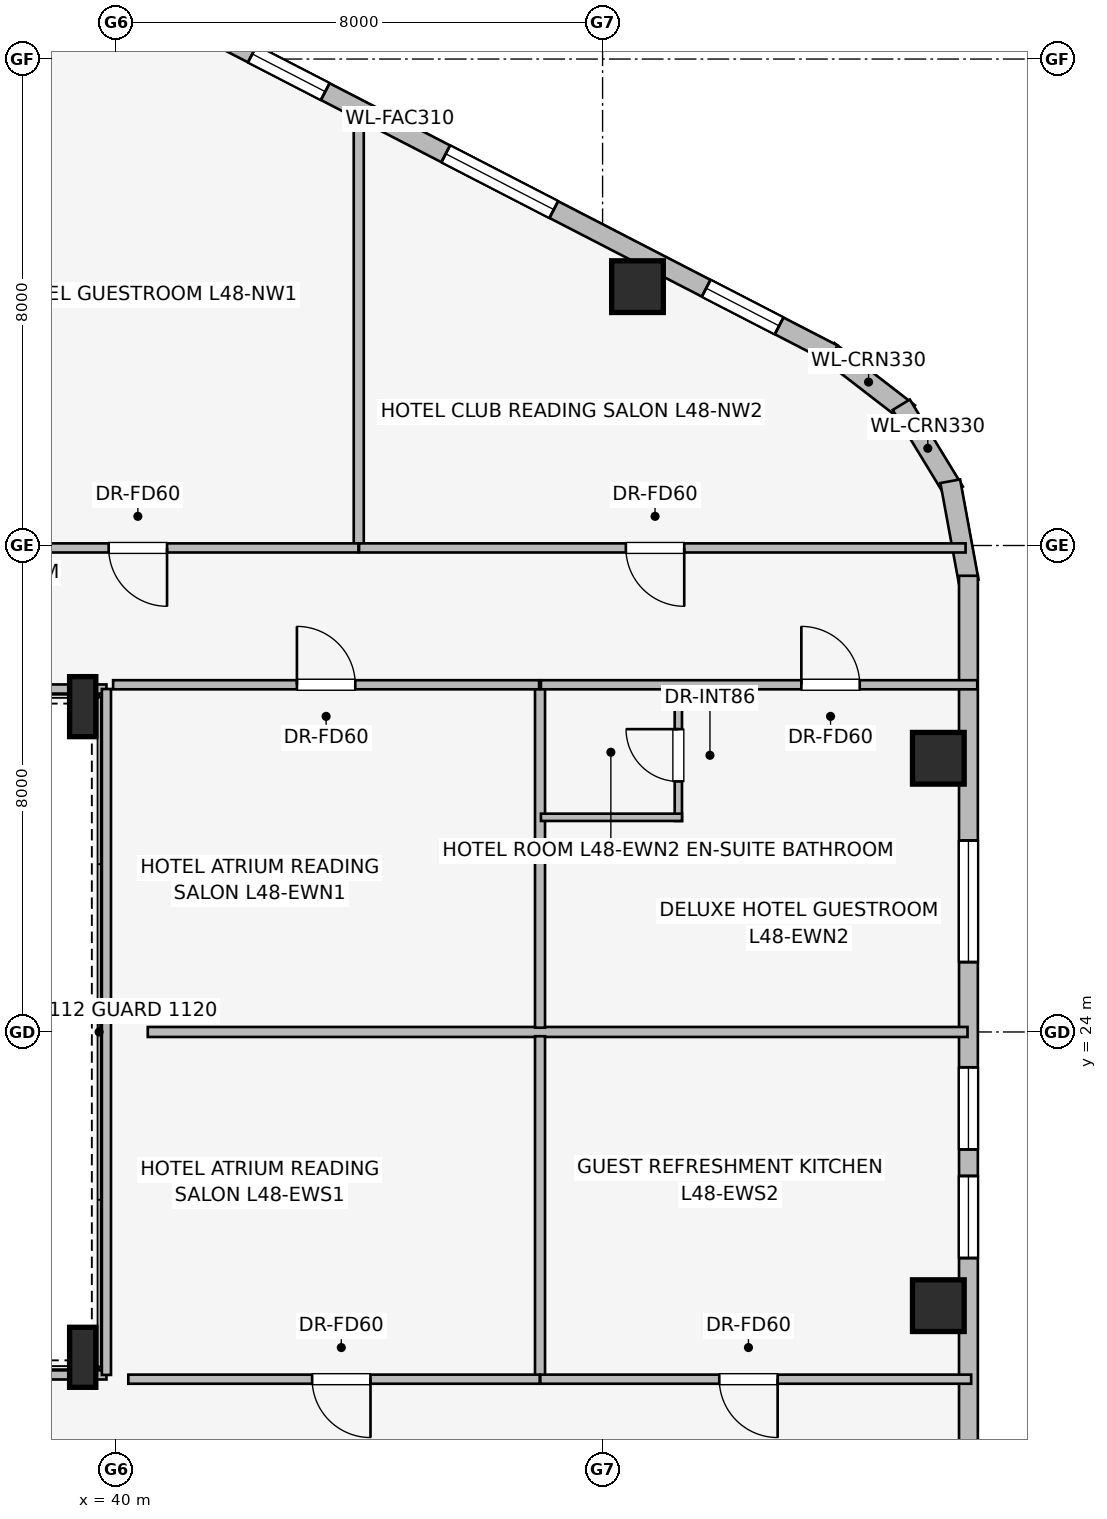
"""IFC4 building model, lengths in metres.
Left out: names, types, materials, properties, quantities, classifications, styles, units other than length and angle.
Written with IfcOpenShell. Run it as: python <this file> out.ifc"""

import sys

from ifc_helpers import new_model, si_unit, direction, frame, frame_2d, origin, origin_2d, place, context, subcontext, project, spatial, rectangle, i_section, extrude, element, fill, save


model = new_model("IFC4")
c1 = context("Model", 3, precision=1e-05, world=origin(), true_north=direction((0.0, 1.0)))
c2 = subcontext(c1, "Body", "Model", "MODEL_VIEW")
j1 = project(units=[si_unit("LENGTHUNIT", "METRE"), si_unit("PLANEANGLEUNIT", "RADIAN")], contexts=[c1])
p1 = place(None, origin())
s1 = spatial("IfcSite", under=j1, at=p1, CompositionType="ELEMENT")
p2 = place(p1, origin())
s2 = spatial("IfcBuilding", under=s1, at=p2, CompositionType="ELEMENT")
p3 = place(p2, frame((0.0, 0.0, 177.45)))
s3 = spatial("IfcBuildingStorey", under=s2, at=p3, CompositionType="ELEMENT", Elevation=177.45)
for number, where, z_axis, x_axis in (
    (1, (48.574, 36.257, 0.0), (0.0, 0.0, 1.0), (1.0, 0.0, 0.0)),
    (2, (53.522, 19.499, 0.0), (0.0, 0.0, 1.0), (1.0, 0.0, 0.0)),
    (3, (53.522, 28.501, 0.0), (0.0, 0.0, 1.0), (1.0, 0.0, 0.0)),
):
    element("IfcColumn", number, at=place(p3, frame(where, z_axis=z_axis, x_axis=x_axis)), inside=s3, PredefinedType="COLUMN", context=c2, shape_type="SweptSolid", body=[
        extrude(rectangle(XDim=0.85, YDim=0.85, at=origin_2d()), origin(), (0.0, 0.0, 1.0), 3.45),
    ])
for number, where, z_axis, x_axis in (
    (4, (39.45, 18.65, 0.0), (0.0, 0.0, 1.0), (1.0, 0.0, 0.0)),
    (5, (39.45, 29.35, 0.0), (0.0, 0.0, 1.0), (1.0, 0.0, 0.0)),
):
    element("IfcColumn", number, at=place(p3, frame(where, z_axis=z_axis, x_axis=x_axis)), inside=s3, PredefinedType="COLUMN", context=c2, shape_type="SweptSolid", body=[
        extrude(i_section(OverallWidth=0.431, OverallDepth=0.987, WebThickness=0.034, FlangeThickness=0.062, at=origin_2d()), origin(), (0.0, 0.0, 1.0), 3.45),
    ])
p4 = place(p3, frame((51.711, 35.2, 0.0), z_axis=(0.0, 0.0, 1.0), x_axis=(0.791464279355, -0.611215423976, 0.0)))
e6 = element("IfcWall", 6, at=p4, inside=s3, PredefinedType="STANDARD", context=c2, shape_type="SweptSolid", body=[
    extrude(rectangle(XDim=1.677, YDim=0.33, at=frame_2d((0.838, 0.0))), origin(), (0.0, 0.0, 1.0), 3.16),
])
p5 = place(p3, frame((52.912, 34.315, 0.0), z_axis=(0.0, 0.0, 1.0), x_axis=(0.520219286058, -0.85403272444, 0.0)))
e7 = element("IfcWall", 7, at=p5, inside=s3, PredefinedType="STANDARD", context=c2, shape_type="SweptSolid", body=[
    extrude(rectangle(XDim=1.678, YDim=0.33, at=frame_2d((0.839, 0.0))), origin(), (0.0, 0.0, 1.0), 3.16),
])
p6 = place(p3, frame((53.718, 33.057, 0.0), z_axis=(0.0, 0.0, 1.0), x_axis=(0.180717642671, -0.983535019014, 0.0)))
e8 = element("IfcWall", 8, at=p6, inside=s3, PredefinedType="STANDARD", context=c2, shape_type="SweptSolid", body=[
    extrude(rectangle(XDim=1.677, YDim=0.33, at=frame_2d((0.838, 0.0))), origin(), (0.0, 0.0, 1.0), 3.16),
])
p7 = place(p3, frame((36.838, 42.871, 0.0), z_axis=(0.0, 0.0, 1.0), x_axis=(0.888626188278, -0.458632202867, 0.0)))
e9 = element("IfcWall", 9, at=p7, inside=s3, PredefinedType="STANDARD", context=c2, shape_type="SweptSolid", body=[
    extrude(rectangle(XDim=16.828, YDim=0.31, at=frame_2d((8.414, 0.0))), origin(), (0.0, 0.0, 1.0), 3.16),
])
p8 = place(p7, frame((0.675, 0.0, 0.75)))
e10 = element("IfcOpeningElement", 10, at=p8, cuts=e9, PredefinedType="OPENING", context=c2, shape_type="SweptSolid", body=[
    extrude(rectangle(XDim=2.0, YDim=1.5, at=frame_2d((1.0, 0.75))), frame((0.0, 0.165, 0.0), z_axis=(0.0, -1.0, 0.0), x_axis=(1.0, 0.0, 0.0)), (0.0, 0.0, 1.0), 0.33),
])
p9 = place(p7, frame((4.196, 0.0, 0.75)))
e11 = element("IfcOpeningElement", 11, at=p9, cuts=e9, PredefinedType="OPENING", context=c2, shape_type="SweptSolid", body=[
    extrude(rectangle(XDim=1.35, YDim=1.45, at=frame_2d((0.675, 0.725))), frame((0.0, 0.165, 0.0), z_axis=(0.0, -1.0, 0.0), x_axis=(1.0, 0.0, 0.0)), (0.0, 0.0, 1.0), 0.33),
])
p10 = place(p7, frame((6.078, 0.0, 0.75)))
e12 = element("IfcOpeningElement", 12, at=p10, cuts=e9, PredefinedType="OPENING", context=c2, shape_type="SweptSolid", body=[
    extrude(rectangle(XDim=1.35, YDim=1.45, at=frame_2d((0.675, 0.725))), frame((0.0, 0.165, 0.0), z_axis=(0.0, -1.0, 0.0), x_axis=(1.0, 0.0, 0.0)), (0.0, 0.0, 1.0), 0.33),
])
p11 = place(p7, frame((9.658, 0.0, 0.75)))
e13 = element("IfcOpeningElement", 13, at=p11, cuts=e9, PredefinedType="OPENING", context=c2, shape_type="SweptSolid", body=[
    extrude(rectangle(XDim=2.0, YDim=1.5, at=frame_2d((1.0, 0.75))), frame((0.0, 0.165, 0.0), z_axis=(0.0, -1.0, 0.0), x_axis=(1.0, 0.0, 0.0)), (0.0, 0.0, 1.0), 0.33),
])
p12 = place(p7, frame((14.478, 0.0, 0.75)))
e14 = element("IfcOpeningElement", 14, at=p12, cuts=e9, PredefinedType="OPENING", context=c2, shape_type="SweptSolid", body=[
    extrude(rectangle(XDim=1.35, YDim=1.45, at=frame_2d((0.675, 0.725))), frame((0.0, 0.165, 0.0), z_axis=(0.0, -1.0, 0.0), x_axis=(1.0, 0.0, 0.0)), (0.0, 0.0, 1.0), 0.33),
])
p13 = place(p3, frame((54.017, 31.502, 0.0), z_axis=(0.0, 0.0, 1.0), x_axis=(0.0, -1.0, 0.0)))
e15 = element("IfcWall", 15, at=p13, inside=s3, PredefinedType="STANDARD", context=c2, shape_type="SweptSolid", body=[
    extrude(rectangle(XDim=15.004, YDim=0.31, at=frame_2d((7.502, 0.0))), origin(), (0.0, 0.0, 1.0), 3.16),
])
p14 = place(p13, frame((4.353, 0.0, 0.75)))
e16 = element("IfcOpeningElement", 16, at=p14, cuts=e15, PredefinedType="OPENING", context=c2, shape_type="SweptSolid", body=[
    extrude(rectangle(XDim=2.0, YDim=1.5, at=frame_2d((1.0, 0.75))), frame((0.0, 0.165, 0.0), z_axis=(0.0, -1.0, 0.0), x_axis=(1.0, 0.0, 0.0)), (0.0, 0.0, 1.0), 0.33),
])
p15 = place(p13, frame((8.083, 0.0, 0.75)))
e17 = element("IfcOpeningElement", 17, at=p15, cuts=e15, PredefinedType="OPENING", context=c2, shape_type="SweptSolid", body=[
    extrude(rectangle(XDim=1.35, YDim=1.45, at=frame_2d((0.675, 0.725))), frame((0.0, 0.165, 0.0), z_axis=(0.0, -1.0, 0.0), x_axis=(1.0, 0.0, 0.0)), (0.0, 0.0, 1.0), 0.33),
])
p16 = place(p13, frame((9.87, 0.0, 0.75)))
e18 = element("IfcOpeningElement", 18, at=p16, cuts=e15, PredefinedType="OPENING", context=c2, shape_type="SweptSolid", body=[
    extrude(rectangle(XDim=1.35, YDim=1.45, at=frame_2d((0.675, 0.725))), frame((0.0, 0.165, 0.0), z_axis=(0.0, -1.0, 0.0), x_axis=(1.0, 0.0, 0.0)), (0.0, 0.0, 1.0), 0.33),
])
p17 = place(p3, frame((27.675, 18.36, 0.0), z_axis=(0.0, 0.0, 1.0), x_axis=(1.0, 0.0, 0.0)))
e19 = element("IfcWall", 19, at=p17, inside=s3, PredefinedType="PARTITIONING", context=c2, shape_type="SweptSolid", body=[
    extrude(rectangle(XDim=12.165, YDim=0.15, at=frame_2d((6.083, 0.0))), origin(), (0.0, 0.0, 1.0), 2.301),
])
p18 = place(p3, frame((39.84, 29.64, 0.0), z_axis=(0.0, 0.0, 1.0), x_axis=(-1.0, 0.0, 0.0)))
e20 = element("IfcWall", 20, at=p18, inside=s3, PredefinedType="PARTITIONING", context=c2, shape_type="SweptSolid", body=[
    extrude(rectangle(XDim=12.2, YDim=0.15, at=frame_2d((6.1, 0.0))), origin(), (0.0, 0.0, 1.0), 2.301),
])
p19 = place(p3, frame((39.84, 18.36, 0.0), z_axis=(0.0, 0.0, 1.0), x_axis=(0.0, 1.0, 0.0)))
e21 = element("IfcWall", 21, at=p19, inside=s3, PredefinedType="PARTITIONING", context=c2, shape_type="SweptSolid", body=[
    extrude(rectangle(XDim=11.28, YDim=0.15, at=frame_2d((5.64, 0.0))), origin(), (0.0, 0.0, 1.0), 3.16),
])
p20 = place(p3, frame((43.99, 31.97, 0.0), z_axis=(0.0, 0.0, 1.0), x_axis=(0.0, 1.0, 0.0)))
e22 = element("IfcWall", 22, at=p20, inside=s3, PredefinedType="PARTITIONING", context=c2, shape_type="SweptSolid", body=[
    extrude(rectangle(XDim=7.193, YDim=0.165, at=frame_2d((3.597, 0.0))), origin(), (0.0, 0.0, 1.0), 3.16),
])
p21 = place(p3, frame((43.985, 31.96, 0.0), z_axis=(0.0, 0.0, 1.0), x_axis=(-1.0, 0.0, 0.0)))
e23 = element("IfcWall", 23, at=p21, inside=s3, PredefinedType="PARTITIONING", context=c2, shape_type="SweptSolid", body=[
    extrude(rectangle(XDim=9.695, YDim=0.15, at=frame_2d((4.848, 0.0))), origin(), (0.0, 0.0, 1.0), 3.16),
])
p22 = place(p21, frame((3.148, 0.0, 0.0)))
e24 = element("IfcOpeningElement", 24, at=p22, cuts=e23, PredefinedType="OPENING", context=c2, shape_type="SweptSolid", body=[
    extrude(rectangle(XDim=0.96, YDim=2.0, at=frame_2d((0.48, 1.0))), frame((0.0, 0.085, 0.0), z_axis=(0.0, -1.0, 0.0), x_axis=(1.0, 0.0, 0.0)), (0.0, 0.0, 1.0), 0.17),
])
p23 = place(p3, frame((53.97, 31.96, 0.0), z_axis=(0.0, 0.0, 1.0), x_axis=(-1.0, 0.0, 0.0)))
e25 = element("IfcWall", 25, at=p23, inside=s3, PredefinedType="PARTITIONING", context=c2, shape_type="SweptSolid", body=[
    extrude(rectangle(XDim=9.975, YDim=0.15, at=frame_2d((4.987, 0.0))), origin(), (0.0, 0.0, 1.0), 3.16),
])
p24 = place(p23, frame((4.627, 0.0, 0.0)))
e26 = element("IfcOpeningElement", 26, at=p24, cuts=e25, PredefinedType="OPENING", context=c2, shape_type="SweptSolid", body=[
    extrude(rectangle(XDim=0.96, YDim=2.0, at=frame_2d((0.48, 1.0))), frame((0.0, 0.085, 0.0), z_axis=(0.0, -1.0, 0.0), x_axis=(1.0, 0.0, 0.0)), (0.0, 0.0, 1.0), 0.17),
])
p25 = place(p3, frame((40.52, 24.0, 0.0), z_axis=(0.0, 0.0, 1.0), x_axis=(1.0, 0.0, 0.0)))
e27 = element("IfcWall", 27, at=p25, inside=s3, PredefinedType="PARTITIONING", context=c2, shape_type="SweptSolid", body=[
    extrude(rectangle(XDim=13.482, YDim=0.165, at=frame_2d((6.741, 0.0))), origin(), (0.0, 0.0, 1.0), 3.16),
])
p26 = place(p3, frame((46.971, 24.07, 0.0), z_axis=(0.0, 0.0, 1.0), x_axis=(0.0, 1.0, 0.0)))
e28 = element("IfcWall", 28, at=p26, inside=s3, PredefinedType="PARTITIONING", context=c2, shape_type="SweptSolid", body=[
    extrude(rectangle(XDim=5.64, YDim=0.165, at=frame_2d((2.82, 0.0))), origin(), (0.0, 0.0, 1.0), 2.703),
])
p27 = place(p3, frame((39.95, 29.71, 0.0), z_axis=(0.0, 0.0, 1.0), x_axis=(1.0, 0.0, 0.0)))
e29 = element("IfcWall", 29, at=p27, inside=s3, PredefinedType="PARTITIONING", context=c2, shape_type="SweptSolid", body=[
    extrude(rectangle(XDim=7.006, YDim=0.15, at=frame_2d((3.503, 0.0))), origin(), (0.0, 0.0, 1.0), 3.16),
])
p28 = place(p27, frame((3.023, 0.0, 0.0)))
e30 = element("IfcOpeningElement", 30, at=p28, cuts=e29, PredefinedType="OPENING", context=c2, shape_type="SweptSolid", body=[
    extrude(rectangle(XDim=0.96, YDim=2.0, at=frame_2d((0.48, 1.0))), frame((0.0, 0.085, 0.0), z_axis=(0.0, -1.0, 0.0), x_axis=(1.0, 0.0, 0.0)), (0.0, 0.0, 1.0), 0.17),
])
p29 = place(p3, frame((49.246, 27.47, 0.0), z_axis=(0.0, 0.0, 1.0), x_axis=(0.0, 1.0, 0.0)))
e31 = element("IfcWall", 31, at=p29, inside=s3, PredefinedType="PARTITIONING", context=c2, shape_type="SweptSolid", body=[
    extrude(rectangle(XDim=2.24, YDim=0.12, at=frame_2d((1.12, 0.0))), origin(), (0.0, 0.0, 1.0), 3.16),
])
p30 = place(p29, frame((0.65, 0.0, 0.0)))
e32 = element("IfcOpeningElement", 32, at=p30, cuts=e31, PredefinedType="OPENING", context=c2, shape_type="SweptSolid", body=[
    extrude(rectangle(XDim=0.86, YDim=2.0, at=frame_2d((0.43, 1.0))), frame((0.0, 0.07, 0.0), z_axis=(0.0, -1.0, 0.0), x_axis=(1.0, 0.0, 0.0)), (0.0, 0.0, 1.0), 0.14),
])
p31 = place(p3, frame((46.986, 27.53, 0.0), z_axis=(0.0, 0.0, 1.0), x_axis=(1.0, 0.0, 0.0)))
e33 = element("IfcWall", 33, at=p31, inside=s3, PredefinedType="PARTITIONING", context=c2, shape_type="SweptSolid", body=[
    extrude(rectangle(XDim=2.32, YDim=0.12, at=frame_2d((1.16, 0.0))), origin(), (0.0, 0.0, 1.0), 3.16),
])
p32 = place(p3, frame((46.986, 29.71, 0.0), z_axis=(0.0, 0.0, 1.0), x_axis=(1.0, 0.0, 0.0)))
e34 = element("IfcWall", 34, at=p32, inside=s3, PredefinedType="PARTITIONING", context=c2, shape_type="SweptSolid", body=[
    extrude(rectangle(XDim=7.176, YDim=0.15, at=frame_2d((3.588, 0.0))), origin(), (0.0, 0.0, 1.0), 3.16),
])
p33 = place(p32, frame((4.283, 0.0, 0.0)))
e35 = element("IfcOpeningElement", 35, at=p33, cuts=e34, PredefinedType="OPENING", context=c2, shape_type="SweptSolid", body=[
    extrude(rectangle(XDim=0.96, YDim=2.0, at=frame_2d((0.48, 1.0))), frame((0.0, 0.085, 0.0), z_axis=(0.0, -1.0, 0.0), x_axis=(1.0, 0.0, 0.0)), (0.0, 0.0, 1.0), 0.17),
])
p34 = place(p3, frame((46.971, 18.29, 0.0), z_axis=(0.0, 0.0, 1.0), x_axis=(0.0, 1.0, 0.0)))
e36 = element("IfcWall", 36, at=p34, inside=s3, PredefinedType="PARTITIONING", context=c2, shape_type="SweptSolid", body=[
    extrude(rectangle(XDim=5.64, YDim=0.165, at=frame_2d((2.82, 0.0))), origin(), (0.0, 0.0, 1.0), 2.703),
])
p35 = place(p3, frame((46.966, 18.29, 0.0), z_axis=(0.0, 0.0, 1.0), x_axis=(-1.0, 0.0, 0.0)))
e37 = element("IfcWall", 37, at=p35, inside=s3, PredefinedType="PARTITIONING", context=c2, shape_type="SweptSolid", body=[
    extrude(rectangle(XDim=6.766, YDim=0.15, at=frame_2d((3.383, 0.0))), origin(), (0.0, 0.0, 1.0), 3.16),
])
p36 = place(p35, frame((2.783, 0.0, 0.0)))
e38 = element("IfcOpeningElement", 38, at=p36, cuts=e37, PredefinedType="OPENING", context=c2, shape_type="SweptSolid", body=[
    extrude(rectangle(XDim=0.96, YDim=2.0, at=frame_2d((0.48, 1.0))), frame((0.0, 0.085, 0.0), z_axis=(0.0, -1.0, 0.0), x_axis=(1.0, 0.0, 0.0)), (0.0, 0.0, 1.0), 0.17),
])
p37 = place(p3, frame((54.062, 18.29, 0.0), z_axis=(0.0, 0.0, 1.0), x_axis=(-1.0, 0.0, 0.0)))
e39 = element("IfcWall", 39, at=p37, inside=s3, PredefinedType="PARTITIONING", context=c2, shape_type="SweptSolid", body=[
    extrude(rectangle(XDim=7.086, YDim=0.15, at=frame_2d((3.543, 0.0))), origin(), (0.0, 0.0, 1.0), 3.16),
])
p38 = place(p37, frame((3.183, 0.0, 0.0)))
e40 = element("IfcOpeningElement", 40, at=p38, cuts=e39, PredefinedType="OPENING", context=c2, shape_type="SweptSolid", body=[
    extrude(rectangle(XDim=0.96, YDim=2.0, at=frame_2d((0.48, 1.0))), frame((0.0, 0.085, 0.0), z_axis=(0.0, -1.0, 0.0), x_axis=(1.0, 0.0, 0.0)), (0.0, 0.0, 1.0), 0.17),
])
p39 = place(p10, origin())
e41 = element("IfcWindow", 41, at=p39, inside=s3, PartitioningType="SINGLE_PANEL", PredefinedType="WINDOW", context=c2, shape_type="SweptSolid", body=[
    extrude(rectangle(XDim=1.35, YDim=1.45, at=frame_2d((0.675, 0.725))), frame((0.0, 0.03, 0.0), z_axis=(0.0, -1.0, 0.0), x_axis=(1.0, 0.0, 0.0)), (0.0, 0.0, 1.0), 0.06),
])
fill(e12, e41)
p40 = place(p11, origin())
e42 = element("IfcWindow", 42, at=p40, inside=s3, PartitioningType="SINGLE_PANEL", PredefinedType="WINDOW", context=c2, shape_type="SweptSolid", body=[
    extrude(rectangle(XDim=2.0, YDim=1.5, at=frame_2d((1.0, 0.75))), frame((0.0, 0.03, 0.0), z_axis=(0.0, -1.0, 0.0), x_axis=(1.0, 0.0, 0.0)), (0.0, 0.0, 1.0), 0.06),
])
fill(e13, e42)
p41 = place(p12, origin())
e43 = element("IfcWindow", 43, at=p41, inside=s3, PartitioningType="SINGLE_PANEL", PredefinedType="WINDOW", context=c2, shape_type="SweptSolid", body=[
    extrude(rectangle(XDim=1.35, YDim=1.45, at=frame_2d((0.675, 0.725))), frame((0.0, 0.03, 0.0), z_axis=(0.0, -1.0, 0.0), x_axis=(1.0, 0.0, 0.0)), (0.0, 0.0, 1.0), 0.06),
])
fill(e14, e43)
p42 = place(p14, origin())
e44 = element("IfcWindow", 44, at=p42, inside=s3, PartitioningType="SINGLE_PANEL", PredefinedType="WINDOW", context=c2, shape_type="SweptSolid", body=[
    extrude(rectangle(XDim=2.0, YDim=1.5, at=frame_2d((1.0, 0.75))), frame((0.0, 0.03, 0.0), z_axis=(0.0, -1.0, 0.0), x_axis=(1.0, 0.0, 0.0)), (0.0, 0.0, 1.0), 0.06),
])
fill(e16, e44)
p43 = place(p15, origin())
e45 = element("IfcWindow", 45, at=p43, inside=s3, PartitioningType="SINGLE_PANEL", PredefinedType="WINDOW", context=c2, shape_type="SweptSolid", body=[
    extrude(rectangle(XDim=1.35, YDim=1.45, at=frame_2d((0.675, 0.725))), frame((0.0, 0.03, 0.0), z_axis=(0.0, -1.0, 0.0), x_axis=(1.0, 0.0, 0.0)), (0.0, 0.0, 1.0), 0.06),
])
fill(e17, e45)
p44 = place(p16, origin())
e46 = element("IfcWindow", 46, at=p44, inside=s3, PartitioningType="SINGLE_PANEL", PredefinedType="WINDOW", context=c2, shape_type="SweptSolid", body=[
    extrude(rectangle(XDim=1.35, YDim=1.45, at=frame_2d((0.675, 0.725))), frame((0.0, 0.03, 0.0), z_axis=(0.0, -1.0, 0.0), x_axis=(1.0, 0.0, 0.0)), (0.0, 0.0, 1.0), 0.06),
])
fill(e18, e46)
p45 = place(p22, origin())
e47 = element("IfcDoor", 47, at=p45, inside=s3, OperationType="SINGLE_SWING_LEFT", PredefinedType="DOOR", context=c2, shape_type="SweptSolid", body=[
    extrude(rectangle(XDim=0.96, YDim=2.0, at=frame_2d((0.48, 1.0))), frame((0.0, 0.025, 0.0), z_axis=(0.0, -1.0, 0.0), x_axis=(1.0, 0.0, 0.0)), (0.0, 0.0, 1.0), 0.05),
])
fill(e24, e47)
p46 = place(p24, origin())
e48 = element("IfcDoor", 48, at=p46, inside=s3, OperationType="SINGLE_SWING_LEFT", PredefinedType="DOOR", context=c2, shape_type="SweptSolid", body=[
    extrude(rectangle(XDim=0.96, YDim=2.0, at=frame_2d((0.48, 1.0))), frame((0.0, 0.025, 0.0), z_axis=(0.0, -1.0, 0.0), x_axis=(1.0, 0.0, 0.0)), (0.0, 0.0, 1.0), 0.05),
])
fill(e26, e48)
p47 = place(p28, origin())
e49 = element("IfcDoor", 49, at=p47, inside=s3, OperationType="SINGLE_SWING_LEFT", PredefinedType="DOOR", context=c2, shape_type="SweptSolid", body=[
    extrude(rectangle(XDim=0.96, YDim=2.0, at=frame_2d((0.48, 1.0))), frame((0.0, 0.025, 0.0), z_axis=(0.0, -1.0, 0.0), x_axis=(1.0, 0.0, 0.0)), (0.0, 0.0, 1.0), 0.05),
])
fill(e30, e49)
p48 = place(p30, origin())
e50 = element("IfcDoor", 50, at=p48, inside=s3, OperationType="SINGLE_SWING_RIGHT", PredefinedType="DOOR", context=c2, shape_type="SweptSolid", body=[
    extrude(rectangle(XDim=0.86, YDim=2.0, at=frame_2d((0.43, 1.0))), frame((0.0, 0.025, 0.0), z_axis=(0.0, -1.0, 0.0), x_axis=(1.0, 0.0, 0.0)), (0.0, 0.0, 1.0), 0.05),
])
fill(e32, e50)
p49 = place(p33, origin())
e51 = element("IfcDoor", 51, at=p49, inside=s3, OperationType="SINGLE_SWING_LEFT", PredefinedType="DOOR", context=c2, shape_type="SweptSolid", body=[
    extrude(rectangle(XDim=0.96, YDim=2.0, at=frame_2d((0.48, 1.0))), frame((0.0, 0.025, 0.0), z_axis=(0.0, -1.0, 0.0), x_axis=(1.0, 0.0, 0.0)), (0.0, 0.0, 1.0), 0.05),
])
fill(e35, e51)
p50 = place(p36, origin())
e52 = element("IfcDoor", 52, at=p50, inside=s3, OperationType="SINGLE_SWING_LEFT", PredefinedType="DOOR", context=c2, shape_type="SweptSolid", body=[
    extrude(rectangle(XDim=0.96, YDim=2.0, at=frame_2d((0.48, 1.0))), frame((0.0, 0.025, 0.0), z_axis=(0.0, -1.0, 0.0), x_axis=(1.0, 0.0, 0.0)), (0.0, 0.0, 1.0), 0.05),
])
fill(e38, e52)
p51 = place(p38, origin())
e53 = element("IfcDoor", 53, at=p51, inside=s3, OperationType="SINGLE_SWING_LEFT", PredefinedType="DOOR", context=c2, shape_type="SweptSolid", body=[
    extrude(rectangle(XDim=0.96, YDim=2.0, at=frame_2d((0.48, 1.0))), frame((0.0, 0.025, 0.0), z_axis=(0.0, -1.0, 0.0), x_axis=(1.0, 0.0, 0.0)), (0.0, 0.0, 1.0), 0.05),
])
fill(e40, e53)
save(model, sys.argv[1])
